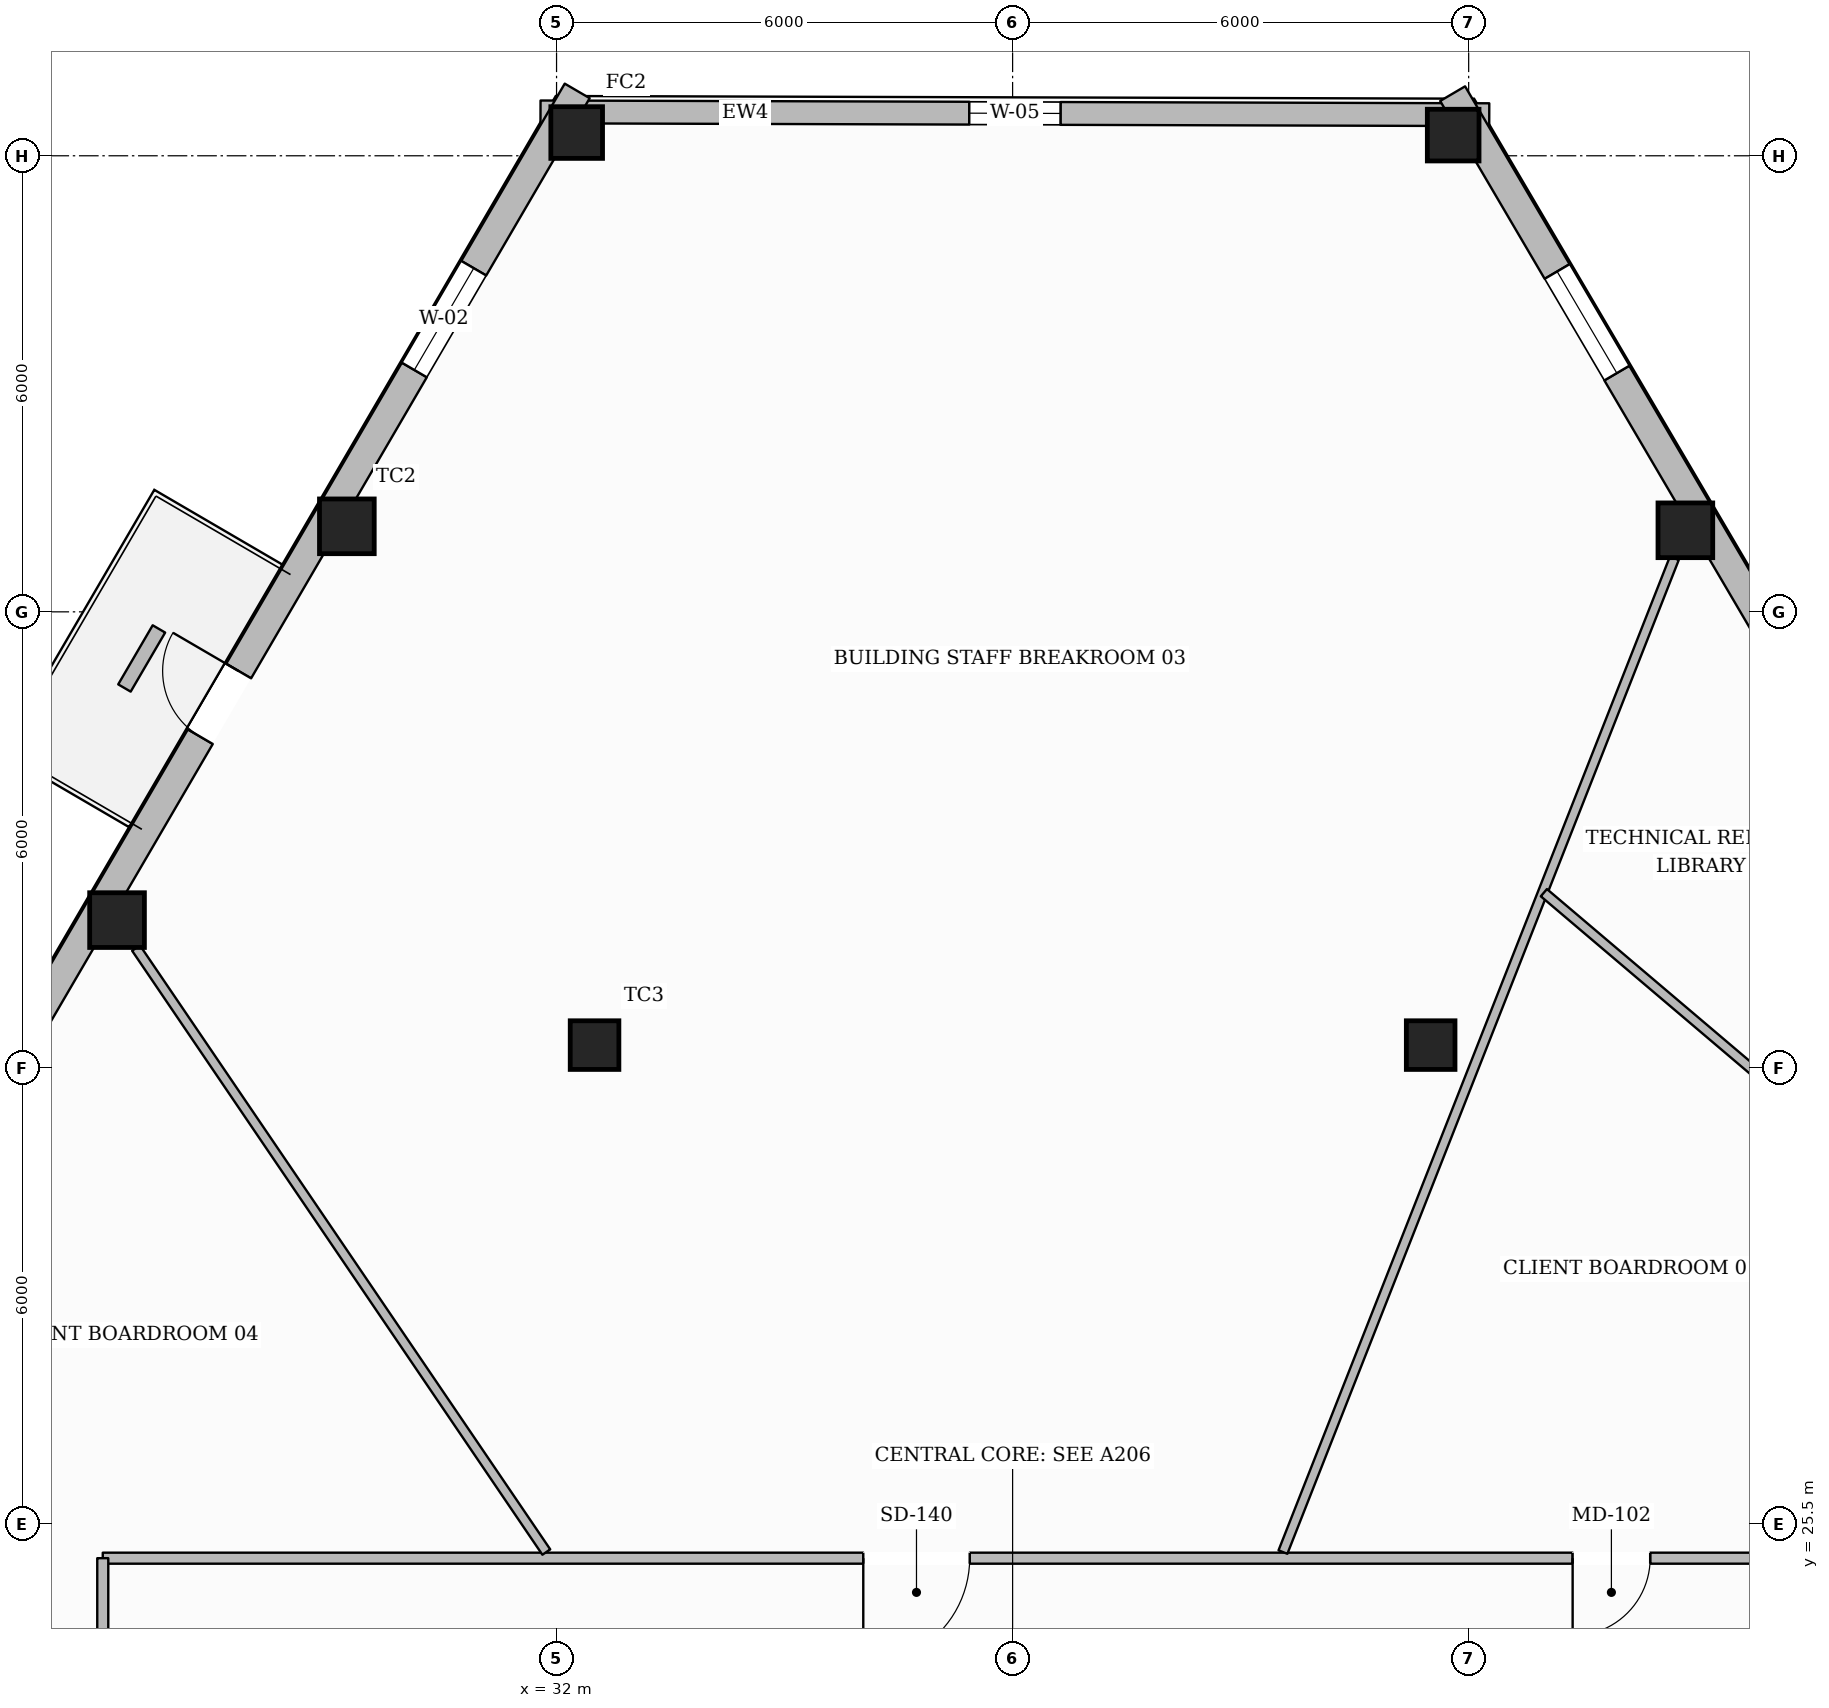
"""IFC4 building model, lengths in metres.
Left out: names, types, materials, properties, quantities, classifications, styles, units other than length and angle.
Written with IfcOpenShell. Run it as: python <this file> out.ifc"""

import sys

from ifc_helpers import new_model, si_unit, direction, frame, frame_2d, origin, origin_2d, place, context, subcontext, project, spatial, rectangle, hollow_rectangle, extrude, element, fill, save


model = new_model("IFC4")
c1 = context("Model", 3, precision=1e-05, world=origin(), true_north=direction((0.0, 1.0)))
c2 = subcontext(c1, "Body", "Model", "MODEL_VIEW")
j1 = project(units=[si_unit("LENGTHUNIT", "METRE"), si_unit("PLANEANGLEUNIT", "RADIAN")], contexts=[c1])
p1 = place(None, origin())
s1 = spatial("IfcSite", under=j1, at=p1, CompositionType="ELEMENT")
p2 = place(p1, origin())
s2 = spatial("IfcBuilding", under=s1, at=p2, CompositionType="ELEMENT")
p3 = place(p2, frame((0.0, 0.0, 127.85)))
s3 = spatial("IfcBuildingStorey", under=s2, at=p3, CompositionType="ELEMENT", Elevation=127.85)
p4 = place(p3, frame((32.265, 43.806, 0.0), z_axis=(0.0, 0.0, 1.0), x_axis=(1.0, 0.0, 0.0)))
e1 = element("IfcColumn", 1, at=p4, inside=s3, PredefinedType="COLUMN", context=c2, shape_type="SweptSolid", body=[
    extrude(hollow_rectangle(XDim=0.68, YDim=0.68, WallThickness=0.03, at=origin_2d()), origin(), (0.0, 0.0, 1.0), 3.6),
])
for number, where, z_axis, x_axis in (
    (2, (29.241, 38.625, 0.0), (0.0, 0.0, 1.0), (1.0, 0.0, 0.0)),
    (3, (26.218, 33.445, 0.0), (0.0, 0.0, 1.0), (1.0, 0.0, 0.0)),
    (4, (46.851, 38.573, 0.0), (0.0, 0.0, 1.0), (1.0, 0.0, 0.0)),
):
    element("IfcColumn", number, at=place(p3, frame(where, z_axis=z_axis, x_axis=x_axis)), inside=s3, PredefinedType="COLUMN", context=c2, shape_type="SweptSolid", body=[
        extrude(hollow_rectangle(XDim=0.72, YDim=0.72, WallThickness=0.032, at=origin_2d()), origin(), (0.0, 0.0, 1.0), 3.6),
    ])
p5 = place(p3, frame((43.796, 43.772, 0.0), z_axis=(0.0, 0.0, 1.0), x_axis=(1.0, 0.0, 0.0)))
e5 = element("IfcColumn", 5, at=p5, inside=s3, PredefinedType="COLUMN", context=c2, shape_type="SweptSolid", body=[
    extrude(hollow_rectangle(XDim=0.68, YDim=0.68, WallThickness=0.03, at=origin_2d()), origin(), (0.0, 0.0, 1.0), 3.6),
])
for number, where, z_axis, x_axis in (
    (6, (32.5, 31.8, 0.0), (0.0, 0.0, 1.0), (1.0, 0.0, 0.0)),
    (7, (43.5, 31.8, 0.0), (0.0, 0.0, 1.0), (1.0, 0.0, 0.0)),
):
    element("IfcColumn", number, at=place(p3, frame(where, z_axis=z_axis, x_axis=x_axis)), inside=s3, PredefinedType="COLUMN", context=c2, shape_type="SweptSolid", body=[
        extrude(hollow_rectangle(XDim=0.64, YDim=0.64, WallThickness=0.028, at=origin_2d()), origin(), (0.0, 0.0, 1.0), 3.6),
    ])
p6 = place(p3, frame((31.789, 44.077, 0.0), z_axis=(0.0, 0.0, 1.0), x_axis=(0.999995753089, -0.002914413051, 0.0)))
e8 = element("IfcWall", 8, at=p6, inside=s3, PredefinedType="STANDARD", context=c2, shape_type="SweptSolid", body=[
    extrude(rectangle(XDim=12.482, YDim=0.3, at=frame_2d((6.241, 0.0))), origin(), (0.0, 0.0, 1.0), 3.059),
])
p7 = place(p6, frame((5.641, 0.0, 0.65)))
e9 = element("IfcOpeningElement", 9, at=p7, cuts=e8, PredefinedType="OPENING", context=c2, shape_type="SweptSolid", body=[
    extrude(rectangle(XDim=1.2, YDim=1.7, at=frame_2d((0.6, 0.85))), frame((0.0, 0.16, 0.0), z_axis=(0.0, -1.0, 0.0), x_axis=(1.0, 0.0, 0.0)), (0.0, 0.0, 1.0), 0.32),
])
p8 = place(p3, frame((13.648, 12.443, 0.0), z_axis=(0.0, 0.0, 1.0), x_axis=(0.504070270963, 0.863662643589, 0.0)))
e10 = element("IfcWall", 10, at=p8, inside=s3, PredefinedType="STANDARD", context=c2, shape_type="SweptSolid", body=[
    extrude(rectangle(XDim=36.948, YDim=0.38, at=frame_2d((18.474, 0.0))), origin(), (0.0, 0.0, 1.0), 3.059),
])
p9 = place(p8, frame((27.111, 0.0, 0.0)))
e11 = element("IfcOpeningElement", 11, at=p9, cuts=e10, PredefinedType="OPENING", context=c2, shape_type="SweptSolid", body=[
    extrude(rectangle(XDim=1.0, YDim=2.2, at=frame_2d((0.5, 1.1))), frame((0.0, 0.2, 0.0), z_axis=(0.0, -1.0, 0.0), x_axis=(1.0, 0.0, 0.0)), (0.0, 0.0, 1.0), 0.4),
])
p10 = place(p8, frame((32.697, 0.0, 0.65)))
e12 = element("IfcOpeningElement", 12, at=p10, cuts=e10, PredefinedType="OPENING", context=c2, shape_type="SweptSolid", body=[
    extrude(rectangle(XDim=1.55, YDim=1.75, at=frame_2d((0.775, 0.875))), frame((0.0, 0.2, 0.0), z_axis=(0.0, -1.0, 0.0), x_axis=(1.0, 0.0, 0.0)), (0.0, 0.0, 1.0), 0.4),
])
p11 = place(p8, frame((20.7, 0.0, 0.65)))
e13 = element("IfcOpeningElement", 13, at=p11, cuts=e10, PredefinedType="OPENING", context=c2, shape_type="SweptSolid", body=[
    extrude(rectangle(XDim=1.55, YDim=1.75, at=frame_2d((0.775, 0.875))), frame((0.0, 0.2, 0.0), z_axis=(0.0, -1.0, 0.0), x_axis=(1.0, 0.0, 0.0)), (0.0, 0.0, 1.0), 0.4),
])
p12 = place(p8, frame((8.704, 0.0, 0.65)))
e14 = element("IfcOpeningElement", 14, at=p12, cuts=e10, PredefinedType="OPENING", context=c2, shape_type="SweptSolid", body=[
    extrude(rectangle(XDim=1.55, YDim=1.75, at=frame_2d((0.775, 0.875))), frame((0.0, 0.2, 0.0), z_axis=(0.0, -1.0, 0.0), x_axis=(1.0, 0.0, 0.0)), (0.0, 0.0, 1.0), 0.4),
])
p13 = place(p8, frame((2.705, 0.0, 0.65)))
e15 = element("IfcOpeningElement", 15, at=p13, cuts=e10, PredefinedType="OPENING", context=c2, shape_type="SweptSolid", body=[
    extrude(rectangle(XDim=1.55, YDim=1.75, at=frame_2d((0.775, 0.875))), frame((0.0, 0.2, 0.0), z_axis=(0.0, -1.0, 0.0), x_axis=(1.0, 0.0, 0.0)), (0.0, 0.0, 1.0), 0.4),
])
p14 = place(p3, frame((43.789, 44.317, 0.0), z_axis=(0.0, 0.0, 1.0), x_axis=(0.506589674511, -0.862187277613, 0.0)))
e16 = element("IfcWall", 16, at=p14, inside=s3, PredefinedType="STANDARD", context=c2, shape_type="SweptSolid", body=[
    extrude(rectangle(XDim=37.135, YDim=0.38, at=frame_2d((18.568, 0.0))), origin(), (0.0, 0.0, 1.0), 3.059),
])
p15 = place(p14, frame((27.252, 0.0, 0.0)))
e17 = element("IfcOpeningElement", 17, at=p15, cuts=e16, PredefinedType="OPENING", context=c2, shape_type="SweptSolid", body=[
    extrude(rectangle(XDim=1.0, YDim=2.2, at=frame_2d((0.5, 1.1))), frame((0.0, 0.2, 0.0), z_axis=(0.0, -1.0, 0.0), x_axis=(1.0, 0.0, 0.0)), (0.0, 0.0, 1.0), 0.4),
])
p16 = place(p14, frame((32.865, 0.0, 0.65)))
e18 = element("IfcOpeningElement", 18, at=p16, cuts=e16, PredefinedType="OPENING", context=c2, shape_type="SweptSolid", body=[
    extrude(rectangle(XDim=1.55, YDim=1.75, at=frame_2d((0.775, 0.875))), frame((0.0, 0.2, 0.0), z_axis=(0.0, -1.0, 0.0), x_axis=(1.0, 0.0, 0.0)), (0.0, 0.0, 1.0), 0.4),
])
p17 = place(p14, frame((20.804, 0.0, 0.65)))
e19 = element("IfcOpeningElement", 19, at=p17, cuts=e16, PredefinedType="OPENING", context=c2, shape_type="SweptSolid", body=[
    extrude(rectangle(XDim=1.55, YDim=1.75, at=frame_2d((0.775, 0.875))), frame((0.0, 0.2, 0.0), z_axis=(0.0, -1.0, 0.0), x_axis=(1.0, 0.0, 0.0)), (0.0, 0.0, 1.0), 0.4),
])
p18 = place(p14, frame((8.744, 0.0, 0.65)))
e20 = element("IfcOpeningElement", 20, at=p18, cuts=e16, PredefinedType="OPENING", context=c2, shape_type="SweptSolid", body=[
    extrude(rectangle(XDim=1.55, YDim=1.75, at=frame_2d((0.775, 0.875))), frame((0.0, 0.2, 0.0), z_axis=(0.0, -1.0, 0.0), x_axis=(1.0, 0.0, 0.0)), (0.0, 0.0, 1.0), 0.4),
])
p19 = place(p14, frame((2.714, 0.0, 0.65)))
e21 = element("IfcOpeningElement", 21, at=p19, cuts=e16, PredefinedType="OPENING", context=c2, shape_type="SweptSolid", body=[
    extrude(rectangle(XDim=1.55, YDim=1.75, at=frame_2d((0.775, 0.875))), frame((0.0, 0.2, 0.0), z_axis=(0.0, -1.0, 0.0), x_axis=(1.0, 0.0, 0.0)), (0.0, 0.0, 1.0), 0.4),
])
p20 = place(p3, frame((26.769, 37.275, 0.0), z_axis=(0.0, 0.0, 1.0), x_axis=(-0.504005947934, -0.863700182035, 0.0)))
e22 = element("IfcWall", 22, at=p20, inside=s3, PredefinedType="USERDEFINED", context=c2, shape_type="SweptSolid", body=[
    extrude(rectangle(XDim=0.9, YDim=0.19, at=frame_2d((0.45, 0.0))), origin(), (0.0, 0.0, 1.0), 0.5),
])
p21 = place(p3, frame((49.97, 25.05, 0.0), z_axis=(0.0, 0.0, 1.0), x_axis=(-1.0, 0.0, 0.0)))
e23 = element("IfcWall", 23, at=p21, inside=s3, PredefinedType="PARTITIONING", context=c2, shape_type="SweptSolid", body=[
    extrude(rectangle(XDim=23.94, YDim=0.145, at=frame_2d((11.97, 0.0))), origin(), (0.0, 0.0, 1.0), 3.6),
])
p22 = place(p21, frame((3.582, 0.0, 0.0)))
e24 = element("IfcOpeningElement", 24, at=p22, cuts=e23, PredefinedType="OPENING", context=c2, shape_type="SweptSolid", body=[
    extrude(rectangle(XDim=1.02, YDim=2.15, at=frame_2d((0.51, 1.075))), frame((0.0, 0.083, 0.0), z_axis=(0.0, -1.0, 0.0), x_axis=(1.0, 0.0, 0.0)), (0.0, 0.0, 1.0), 0.165),
])
p23 = place(p21, frame((12.535, 0.0, 0.0)))
e25 = element("IfcOpeningElement", 25, at=p23, cuts=e23, PredefinedType="OPENING", context=c2, shape_type="SweptSolid", body=[
    extrude(rectangle(XDim=1.4, YDim=2.2, at=frame_2d((0.7, 1.1))), frame((0.0, 0.083, 0.0), z_axis=(0.0, -1.0, 0.0), x_axis=(1.0, 0.0, 0.0)), (0.0, 0.0, 1.0), 0.165),
])
p24 = place(p3, frame((26.03, 25.05, 0.0), z_axis=(0.0, 0.0, 1.0), x_axis=(0.0, -1.0, 0.0)))
e26 = element("IfcWall", 26, at=p24, inside=s3, PredefinedType="PARTITIONING", context=c2, shape_type="SweptSolid", body=[
    extrude(rectangle(XDim=17.9, YDim=0.145, at=frame_2d((8.95, 0.0))), origin(), (0.0, 0.0, 1.0), 3.288),
])
p25 = place(p24, frame((3.53, 0.0, 0.0)))
e27 = element("IfcOpeningElement", 27, at=p25, cuts=e26, PredefinedType="OPENING", context=c2, shape_type="SweptSolid", body=[
    extrude(rectangle(XDim=1.02, YDim=2.15, at=frame_2d((0.51, 1.075))), frame((0.0, 0.083, 0.0), z_axis=(0.0, -1.0, 0.0), x_axis=(1.0, 0.0, 0.0)), (0.0, 0.0, 1.0), 0.165),
])
p26 = place(p24, frame((12.309, 0.0, 0.0)))
e28 = element("IfcOpeningElement", 28, at=p26, cuts=e26, PredefinedType="OPENING", context=c2, shape_type="SweptSolid", body=[
    extrude(rectangle(XDim=1.02, YDim=2.15, at=frame_2d((0.51, 1.075))), frame((0.0, 0.083, 0.0), z_axis=(0.0, -1.0, 0.0), x_axis=(1.0, 0.0, 0.0)), (0.0, 0.0, 1.0), 0.165),
])
p27 = place(p3, frame((41.557, 25.131, 0.0), z_axis=(0.0, 0.0, 1.0), x_axis=(0.366460710129, 0.930433526874, 0.0)))
e29 = element("IfcWall", 29, at=p27, inside=s3, PredefinedType="PARTITIONING", context=c2, shape_type="SweptSolid", body=[
    extrude(rectangle(XDim=14.052, YDim=0.125, at=frame_2d((7.026, 0.0))), origin(), (0.0, 0.0, 1.0), 3.141),
])
p28 = place(p3, frame((31.865, 25.131, 0.0), z_axis=(0.0, 0.0, 1.0), x_axis=(-0.561922740885, 0.827189720243, 0.0)))
e30 = element("IfcWall", 30, at=p28, inside=s3, PredefinedType="PARTITIONING", context=c2, shape_type="SweptSolid", body=[
    extrude(rectangle(XDim=9.606, YDim=0.125, at=frame_2d((4.803, 0.0))), origin(), (0.0, 0.0, 1.0), 3.6),
])
p29 = place(p3, frame((54.565, 25.681, 0.0), z_axis=(0.0, 0.0, 1.0), x_axis=(-0.762514657575, 0.646970939829, 0.0)))
e31 = element("IfcWall", 31, at=p29, inside=s3, PredefinedType="PARTITIONING", context=c2, shape_type="SweptSolid", body=[
    extrude(rectangle(XDim=12.557, YDim=0.125, at=frame_2d((6.279, 0.0))), origin(), (0.0, 0.0, 1.0), 3.062),
])
p30 = place(p29, frame((5.745, 0.0, 0.0)))
e32 = element("IfcOpeningElement", 32, at=p30, cuts=e31, PredefinedType="OPENING", context=c2, shape_type="SweptSolid", body=[
    extrude(rectangle(XDim=0.98, YDim=2.15, at=frame_2d((0.49, 1.075))), frame((0.0, 0.073, 0.0), z_axis=(0.0, -1.0, 0.0), x_axis=(1.0, 0.0, 0.0)), (0.0, 0.0, 1.0), 0.145),
])
p31 = place(p9, origin())
e33 = element("IfcDoor", 33, at=p31, inside=s3, OperationType="SINGLE_SWING_RIGHT", PredefinedType="DOOR", context=c2, shape_type="SweptSolid", body=[
    extrude(rectangle(XDim=1.0, YDim=2.2, at=frame_2d((0.5, 1.1))), frame((0.0, 0.025, 0.0), z_axis=(0.0, -1.0, 0.0), x_axis=(1.0, 0.0, 0.0)), (0.0, 0.0, 1.0), 0.05),
])
fill(e11, e33)
p32 = place(p10, origin())
e34 = element("IfcWindow", 34, at=p32, inside=s3, PartitioningType="SINGLE_PANEL", PredefinedType="WINDOW", context=c2, shape_type="SweptSolid", body=[
    extrude(rectangle(XDim=1.55, YDim=1.75, at=frame_2d((0.775, 0.875))), frame((0.0, 0.03, 0.0), z_axis=(0.0, -1.0, 0.0), x_axis=(1.0, 0.0, 0.0)), (0.0, 0.0, 1.0), 0.06),
])
fill(e12, e34)
p33 = place(p19, origin())
e35 = element("IfcWindow", 35, at=p33, inside=s3, PartitioningType="SINGLE_PANEL", PredefinedType="WINDOW", context=c2, shape_type="SweptSolid", body=[
    extrude(rectangle(XDim=1.55, YDim=1.75, at=frame_2d((0.775, 0.875))), frame((0.0, 0.03, 0.0), z_axis=(0.0, -1.0, 0.0), x_axis=(1.0, 0.0, 0.0)), (0.0, 0.0, 1.0), 0.06),
])
fill(e21, e35)
p34 = place(p7, origin())
e36 = element("IfcWindow", 36, at=p34, inside=s3, PartitioningType="SINGLE_PANEL", PredefinedType="WINDOW", context=c2, shape_type="SweptSolid", body=[
    extrude(rectangle(XDim=1.2, YDim=1.7, at=frame_2d((0.6, 0.85))), frame((0.0, 0.03, 0.0), z_axis=(0.0, -1.0, 0.0), x_axis=(1.0, 0.0, 0.0)), (0.0, 0.0, 1.0), 0.06),
])
fill(e9, e36)
p35 = place(p22, origin())
e37 = element("IfcDoor", 37, at=p35, inside=s3, OperationType="SINGLE_SWING_RIGHT", PredefinedType="DOOR", context=c2, shape_type="SweptSolid", body=[
    extrude(rectangle(XDim=1.02, YDim=2.15, at=frame_2d((0.51, 1.075))), frame((0.0, 0.025, 0.0), z_axis=(0.0, -1.0, 0.0), x_axis=(1.0, 0.0, 0.0)), (0.0, 0.0, 1.0), 0.05),
])
fill(e24, e37)
p36 = place(p23, origin())
e38 = element("IfcDoor", 38, at=p36, inside=s3, OperationType="SINGLE_SWING_RIGHT", PredefinedType="DOOR", context=c2, shape_type="SweptSolid", body=[
    extrude(rectangle(XDim=1.4, YDim=2.2, at=frame_2d((0.7, 1.1))), frame((0.0, 0.025, 0.0), z_axis=(0.0, -1.0, 0.0), x_axis=(1.0, 0.0, 0.0)), (0.0, 0.0, 1.0), 0.05),
])
fill(e25, e38)
save(model, sys.argv[1])
